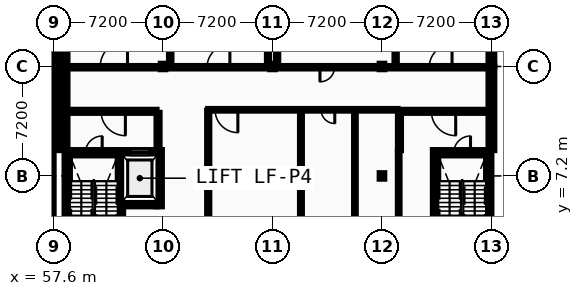
"""IFC4 building model, lengths in metres.
Left out: names, types, materials, properties, quantities, classifications, styles, units other than length and angle.
Written with IfcOpenShell. Run it as: python <this file> out.ifc"""

import sys

from ifc_helpers import new_model, si_unit, direction, frame, frame_2d, origin, origin_2d, place, context, subcontext, project, spatial, rectangle, i_section, extrude, element, fill, save


model = new_model("IFC4")
c1 = context("Model", 3, precision=1e-05, world=origin(), true_north=direction((0.0, 1.0)))
c2 = subcontext(c1, "Body", "Model", "MODEL_VIEW")
j1 = project(units=[si_unit("LENGTHUNIT", "METRE"), si_unit("PLANEANGLEUNIT", "RADIAN")], contexts=[c1])
p1 = place(None, origin())
s1 = spatial("IfcSite", under=j1, at=p1, CompositionType="ELEMENT")
p2 = place(p1, origin())
s2 = spatial("IfcBuilding", under=s1, at=p2, CompositionType="ELEMENT")
p3 = place(p2, frame((0.0, 0.0, 9.6)))
s3 = spatial("IfcBuildingStorey", under=s2, at=p3, CompositionType="ELEMENT", Elevation=9.6)
for number, where, z_axis, x_axis in (
    (1, (57.6, 14.4, 0.0), (0.0, 0.0, 1.0), (1.0, 0.0, 0.0)),
    (2, (58.32, 14.4, 0.0), (0.0, 0.0, 1.0), (1.0, 0.0, 0.0)),
    (3, (64.8, 14.4, 0.0), (0.0, 0.0, 1.0), (1.0, 0.0, 0.0)),
    (4, (72.0, 7.2, 0.0), (0.0, 0.0, 1.0), (1.0, 0.0, 0.0)),
    (5, (72.0, 14.4, 0.0), (0.0, 0.0, 1.0), (1.0, 0.0, 0.0)),
    (6, (79.2, 7.2, 0.0), (0.0, 0.0, 1.0), (1.0, 0.0, 0.0)),
    (7, (79.2, 14.4, 0.0), (0.0, 0.0, 1.0), (1.0, 0.0, 0.0)),
    (8, (86.4, 14.4, 0.0), (0.0, 0.0, 1.0), (1.0, 0.0, 0.0)),
):
    element("IfcColumn", number, at=place(p3, frame(where, z_axis=z_axis, x_axis=x_axis)), inside=s3, PredefinedType="COLUMN", context=c2, shape_type="SweptSolid", body=[
        extrude(i_section(OverallWidth=0.3, OverallDepth=0.36, WebThickness=0.012, FlangeThickness=0.022, FilletRadius=0.027, at=origin_2d()), origin(), (0.0, 0.0, 1.0), 4.4),
    ])
p4 = place(p3, frame((57.6, 8.9, 0.0), z_axis=(0.0, 0.0, 1.0), x_axis=(0.0, 1.0, 0.0)))
e9 = element("IfcWall", 9, at=p4, inside=s3, PredefinedType="STANDARD", context=c2, shape_type="SweptSolid", body=[
    extrude(rectangle(XDim=5.5, YDim=0.38, at=frame_2d((2.75, 0.0))), origin(), (0.0, 0.0, 1.0), 4.2),
])
p5 = place(p3, frame((57.6, 14.4, 0.0), z_axis=(0.0, 0.0, 1.0), x_axis=(0.0, 1.0, 0.0)))
e10 = element("IfcWall", 10, at=p5, inside=s3, PredefinedType="STANDARD", context=c2, shape_type="SweptSolid", body=[
    extrude(rectangle(XDim=7.2, YDim=0.38, at=frame_2d((3.6, 0.0))), origin(), (0.0, 0.0, 1.0), 3.895),
])
p6 = place(p5, frame((1.594, 0.0, 0.95)))
e11 = element("IfcOpeningElement", 11, at=p6, cuts=e10, PredefinedType="OPENING", context=c2, shape_type="SweptSolid", body=[
    extrude(rectangle(XDim=1.132, YDim=1.368, at=frame_2d((0.566, 0.684))), frame((0.0, 0.2, 0.0), z_axis=(0.0, -1.0, 0.0), x_axis=(1.0, 0.0, 0.0)), (0.0, 0.0, 1.0), 0.4),
])
p7 = place(p5, frame((4.474, 0.0, 0.95)))
e12 = element("IfcOpeningElement", 12, at=p7, cuts=e10, PredefinedType="OPENING", context=c2, shape_type="SweptSolid", body=[
    extrude(rectangle(XDim=1.132, YDim=1.368, at=frame_2d((0.566, 0.684))), frame((0.0, 0.2, 0.0), z_axis=(0.0, -1.0, 0.0), x_axis=(1.0, 0.0, 0.0)), (0.0, 0.0, 1.0), 0.4),
])
p8 = place(p3, frame((58.32, 14.4, 0.0), z_axis=(0.0, 0.0, 1.0), x_axis=(0.0, -1.0, 0.0)))
e13 = element("IfcWall", 13, at=p8, inside=s3, PredefinedType="STANDARD", context=c2, shape_type="SweptSolid", body=[
    extrude(rectangle(XDim=5.5, YDim=0.38, at=frame_2d((2.75, 0.0))), origin(), (0.0, 0.0, 1.0), 4.2),
])
p9 = place(p3, frame((58.32, 21.6, 0.0), z_axis=(0.0, 0.0, 1.0), x_axis=(0.0, -1.0, 0.0)))
e14 = element("IfcWall", 14, at=p9, inside=s3, PredefinedType="STANDARD", context=c2, shape_type="SweptSolid", body=[
    extrude(rectangle(XDim=7.2, YDim=0.38, at=frame_2d((3.6, 0.0))), origin(), (0.0, 0.0, 1.0), 3.895),
])
p10 = place(p9, frame((1.713, 0.0, 0.95)))
e15 = element("IfcOpeningElement", 15, at=p10, cuts=e14, PredefinedType="OPENING", context=c2, shape_type="SweptSolid", body=[
    extrude(rectangle(XDim=0.894, YDim=1.332, at=frame_2d((0.447, 0.666))), frame((0.0, 0.2, 0.0), z_axis=(0.0, -1.0, 0.0), x_axis=(1.0, 0.0, 0.0)), (0.0, 0.0, 1.0), 0.4),
])
p11 = place(p9, frame((4.593, 0.0, 0.95)))
e16 = element("IfcOpeningElement", 16, at=p11, cuts=e14, PredefinedType="OPENING", context=c2, shape_type="SweptSolid", body=[
    extrude(rectangle(XDim=0.894, YDim=1.332, at=frame_2d((0.447, 0.666))), frame((0.0, 0.2, 0.0), z_axis=(0.0, -1.0, 0.0), x_axis=(1.0, 0.0, 0.0)), (0.0, 0.0, 1.0), 0.4),
])
p12 = place(p3, frame((86.4, 8.9, 0.0), z_axis=(0.0, 0.0, 1.0), x_axis=(0.0, 1.0, 0.0)))
e17 = element("IfcWall", 17, at=p12, inside=s3, PredefinedType="STANDARD", context=c2, shape_type="SweptSolid", body=[
    extrude(rectangle(XDim=5.5, YDim=0.38, at=frame_2d((2.75, 0.0))), origin(), (0.0, 0.0, 1.0), 4.2),
])
p13 = place(p3, frame((86.4, 14.4, 0.0), z_axis=(0.0, 0.0, 1.0), x_axis=(0.0, 1.0, 0.0)))
e18 = element("IfcWall", 18, at=p13, inside=s3, PredefinedType="STANDARD", context=c2, shape_type="SweptSolid", body=[
    extrude(rectangle(XDim=7.2, YDim=0.38, at=frame_2d((3.6, 0.0))), origin(), (0.0, 0.0, 1.0), 3.885),
])
p14 = place(p13, frame((1.662, 0.0, 0.95)))
e19 = element("IfcOpeningElement", 19, at=p14, cuts=e18, PredefinedType="OPENING", context=c2, shape_type="SweptSolid", body=[
    extrude(rectangle(XDim=0.996, YDim=1.332, at=frame_2d((0.498, 0.666))), frame((0.0, 0.2, 0.0), z_axis=(0.0, -1.0, 0.0), x_axis=(1.0, 0.0, 0.0)), (0.0, 0.0, 1.0), 0.4),
])
p15 = place(p13, frame((4.542, 0.0, 0.95)))
e20 = element("IfcOpeningElement", 20, at=p15, cuts=e18, PredefinedType="OPENING", context=c2, shape_type="SweptSolid", body=[
    extrude(rectangle(XDim=0.996, YDim=1.332, at=frame_2d((0.498, 0.666))), frame((0.0, 0.2, 0.0), z_axis=(0.0, -1.0, 0.0), x_axis=(1.0, 0.0, 0.0)), (0.0, 0.0, 1.0), 0.4),
])
p16 = place(p3, frame((57.425, 0.4, 0.0), z_axis=(0.0, 0.0, 1.0), x_axis=(0.0, 1.0, 0.0)))
e21 = element("IfcWall", 21, at=p16, inside=s3, PredefinedType="SHEAR", context=c2, shape_type="SweptSolid", body=[
    extrude(rectangle(XDim=8.5, YDim=0.35, at=frame_2d((4.25, 0.0))), origin(), (0.0, 0.0, 1.0), 4.2),
])
p17 = place(p3, frame((58.67, 8.725, 0.0), z_axis=(0.0, 0.0, 1.0), x_axis=(1.0, 0.0, 0.0)))
e22 = element("IfcWall", 22, at=p17, inside=s3, PredefinedType="SHEAR", context=c2, shape_type="SweptSolid", body=[
    extrude(rectangle(XDim=3.15, YDim=0.35, at=frame_2d((1.575, 0.0))), origin(), (0.0, 0.0, 1.0), 4.2),
])
p18 = place(p17, frame((1.025, 0.0, 0.0)))
e23 = element("IfcOpeningElement", 23, at=p18, cuts=e22, PredefinedType="OPENING", context=c2, shape_type="SweptSolid", body=[
    extrude(rectangle(XDim=1.1, YDim=2.15, at=frame_2d((0.55, 1.075))), frame((0.0, 0.185, 0.0), z_axis=(0.0, -1.0, 0.0), x_axis=(1.0, 0.0, 0.0)), (0.0, 0.0, 1.0), 0.37),
])
for number, where, z_axis, x_axis in (
    (24, (58.495, 0.4, 0.0), (0.0, 0.0, 1.0), (0.0, 1.0, 0.0)),
    (25, (61.995, 0.4, 0.0), (0.0, 0.0, 1.0), (0.0, 1.0, 0.0)),
):
    element("IfcWall", number, at=place(p3, frame(where, z_axis=z_axis, x_axis=x_axis)), inside=s3, PredefinedType="SHEAR", context=c2, shape_type="SweptSolid", body=[
        extrude(rectangle(XDim=8.5, YDim=0.35, at=frame_2d((4.25, 0.0))), origin(), (0.0, 0.0, 1.0), 4.2),
    ])
p19 = place(p3, frame((62.17, 5.375, 0.0), z_axis=(0.0, 0.0, 1.0), x_axis=(1.0, 0.0, 0.0)))
e26 = element("IfcWall", 26, at=p19, inside=s3, PredefinedType="SHEAR", context=c2, shape_type="SweptSolid", body=[
    extrude(rectangle(XDim=2.2, YDim=0.35, at=frame_2d((1.1, 0.0))), origin(), (0.0, 0.0, 1.0), 4.2),
])
p20 = place(p3, frame((62.17, 8.725, 0.0), z_axis=(0.0, 0.0, 1.0), x_axis=(1.0, 0.0, 0.0)))
e27 = element("IfcWall", 27, at=p20, inside=s3, PredefinedType="SHEAR", context=c2, shape_type="SweptSolid", body=[
    extrude(rectangle(XDim=2.2, YDim=0.35, at=frame_2d((1.1, 0.0))), origin(), (0.0, 0.0, 1.0), 4.2),
])
p21 = place(p20, frame((0.5, 0.0, 0.0)))
e28 = element("IfcOpeningElement", 28, at=p21, cuts=e27, PredefinedType="OPENING", context=c2, shape_type="SweptSolid", body=[
    extrude(rectangle(XDim=1.2, YDim=2.2, at=frame_2d((0.6, 1.1))), frame((0.0, 0.185, 0.0), z_axis=(0.0, -1.0, 0.0), x_axis=(1.0, 0.0, 0.0)), (0.0, 0.0, 1.0), 0.37),
])
p22 = place(p3, frame((64.545, 5.2, 0.0), z_axis=(0.0, 0.0, 1.0), x_axis=(0.0, 1.0, 0.0)))
e29 = element("IfcWall", 29, at=p22, inside=s3, PredefinedType="SHEAR", context=c2, shape_type="SweptSolid", body=[
    extrude(rectangle(XDim=3.7, YDim=0.35, at=frame_2d((1.85, 0.0))), origin(), (0.0, 0.0, 1.0), 4.2),
])
p23 = place(p3, frame((58.67, 11.45, 0.0), z_axis=(0.0, 0.0, 1.0), x_axis=(1.0, 0.0, 0.0)))
e30 = element("IfcWall", 30, at=p23, inside=s3, PredefinedType="PARTITIONING", context=c2, shape_type="SweptSolid", body=[
    extrude(rectangle(XDim=5.7, YDim=0.2, at=frame_2d((2.85, 0.0))), origin(), (0.0, 0.0, 1.0), 4.2),
])
p24 = place(p23, frame((2.05, 0.0, 0.0)))
e31 = element("IfcOpeningElement", 31, at=p24, cuts=e30, PredefinedType="OPENING", context=c2, shape_type="SweptSolid", body=[
    extrude(rectangle(XDim=1.6, YDim=2.2, at=frame_2d((0.8, 1.1))), frame((0.0, 0.11, 0.0), z_axis=(0.0, -1.0, 0.0), x_axis=(1.0, 0.0, 0.0)), (0.0, 0.0, 1.0), 0.22),
])
p25 = place(p3, frame((64.47, 8.9, 0.0), z_axis=(0.0, 0.0, 1.0), x_axis=(0.0, 1.0, 0.0)))
e32 = element("IfcWall", 32, at=p25, inside=s3, PredefinedType="PARTITIONING", context=c2, shape_type="SweptSolid", body=[
    extrude(rectangle(XDim=2.45, YDim=0.2, at=frame_2d((1.225, 0.0))), origin(), (0.0, 0.0, 1.0), 4.2),
])
p26 = place(p3, frame((82.9, 8.725, 0.0), z_axis=(0.0, 0.0, 1.0), x_axis=(1.0, 0.0, 0.0)))
e33 = element("IfcWall", 33, at=p26, inside=s3, PredefinedType="SHEAR", context=c2, shape_type="SweptSolid", body=[
    extrude(rectangle(XDim=3.15, YDim=0.35, at=frame_2d((1.575, 0.0))), origin(), (0.0, 0.0, 1.0), 4.2),
])
p27 = place(p26, frame((1.025, 0.0, 0.0)))
e34 = element("IfcOpeningElement", 34, at=p27, cuts=e33, PredefinedType="OPENING", context=c2, shape_type="SweptSolid", body=[
    extrude(rectangle(XDim=1.1, YDim=2.15, at=frame_2d((0.55, 1.075))), frame((0.0, 0.185, 0.0), z_axis=(0.0, -1.0, 0.0), x_axis=(1.0, 0.0, 0.0)), (0.0, 0.0, 1.0), 0.37),
])
for number, where, z_axis, x_axis in (
    (35, (82.725, 0.19, 0.0), (0.0, 0.0, 1.0), (0.0, 1.0, 0.0)),
    (36, (86.225, 0.19, 0.0), (0.0, 0.0, 1.0), (0.0, 1.0, 0.0)),
):
    element("IfcWall", number, at=place(p3, frame(where, z_axis=z_axis, x_axis=x_axis)), inside=s3, PredefinedType="SHEAR", context=c2, shape_type="SweptSolid", body=[
        extrude(rectangle(XDim=8.71, YDim=0.35, at=frame_2d((4.355, 0.0))), origin(), (0.0, 0.0, 1.0), 4.2),
    ])
p28 = place(p3, frame((80.45, 11.45, 0.0), z_axis=(0.0, 0.0, 1.0), x_axis=(1.0, 0.0, 0.0)))
e37 = element("IfcWall", 37, at=p28, inside=s3, PredefinedType="PARTITIONING", context=c2, shape_type="SweptSolid", body=[
    extrude(rectangle(XDim=5.6, YDim=0.2, at=frame_2d((2.8, 0.0))), origin(), (0.0, 0.0, 1.0), 4.2),
])
p29 = place(p28, frame((2.0, 0.0, 0.0)))
e38 = element("IfcOpeningElement", 38, at=p29, cuts=e37, PredefinedType="OPENING", context=c2, shape_type="SweptSolid", body=[
    extrude(rectangle(XDim=1.6, YDim=2.2, at=frame_2d((0.8, 1.1))), frame((0.0, 0.11, 0.0), z_axis=(0.0, -1.0, 0.0), x_axis=(1.0, 0.0, 0.0)), (0.0, 0.0, 1.0), 0.22),
])
p30 = place(p3, frame((80.35, 8.9, 0.0), z_axis=(0.0, 0.0, 1.0), x_axis=(0.0, 1.0, 0.0)))
e39 = element("IfcWall", 39, at=p30, inside=s3, PredefinedType="PARTITIONING", context=c2, shape_type="SweptSolid", body=[
    extrude(rectangle(XDim=2.45, YDim=0.2, at=frame_2d((1.225, 0.0))), origin(), (0.0, 0.0, 1.0), 4.2),
])
p31 = place(p3, frame((67.77, 11.55, 0.0), z_axis=(0.0, 0.0, 1.0), x_axis=(1.0, 0.0, 0.0)))
e40 = element("IfcWall", 40, at=p31, inside=s3, PredefinedType="PARTITIONING", context=c2, shape_type="SweptSolid", body=[
    extrude(rectangle(XDim=12.46, YDim=0.11, at=frame_2d((6.23, 0.0))), origin(), (0.0, 0.0, 1.0), 4.2),
])
p32 = place(p31, frame((10.1, 0.0, 0.0)))
e41 = element("IfcOpeningElement", 41, at=p32, cuts=e40, PredefinedType="OPENING", context=c2, shape_type="SweptSolid", body=[
    extrude(rectangle(XDim=1.0, YDim=2.1, at=frame_2d((0.5, 1.05))), frame((0.0, 0.065, 0.0), z_axis=(0.0, -1.0, 0.0), x_axis=(1.0, 0.0, 0.0)), (0.0, 0.0, 1.0), 0.13),
])
p33 = place(p31, frame((7.425, 0.0, 0.0)))
e42 = element("IfcOpeningElement", 42, at=p33, cuts=e40, PredefinedType="OPENING", context=c2, shape_type="SweptSolid", body=[
    extrude(rectangle(XDim=0.9, YDim=2.1, at=frame_2d((0.45, 1.05))), frame((0.0, 0.065, 0.0), z_axis=(0.0, -1.0, 0.0), x_axis=(1.0, 0.0, 0.0)), (0.0, 0.0, 1.0), 0.13),
])
p34 = place(p31, frame((0.45, 0.0, 0.0)))
e43 = element("IfcOpeningElement", 43, at=p34, cuts=e40, PredefinedType="OPENING", context=c2, shape_type="SweptSolid", body=[
    extrude(rectangle(XDim=1.5, YDim=2.2, at=frame_2d((0.75, 1.1))), frame((0.0, 0.065, 0.0), z_axis=(0.0, -1.0, 0.0), x_axis=(1.0, 0.0, 0.0)), (0.0, 0.0, 1.0), 0.13),
])
p35 = place(p3, frame((58.7, 14.35, 0.0), z_axis=(0.0, 0.0, 1.0), x_axis=(1.0, 0.0, 0.0)))
e44 = element("IfcWall", 44, at=p35, inside=s3, PredefinedType="PARTITIONING", context=c2, shape_type="SweptSolid", body=[
    extrude(rectangle(XDim=5.72, YDim=0.16, at=frame_2d((2.86, 0.0))), origin(), (0.0, 0.0, 1.0), 3.895),
])
p36 = place(p35, frame((1.96, 0.0, 0.0)))
e45 = element("IfcOpeningElement", 45, at=p36, cuts=e44, PredefinedType="OPENING", context=c2, shape_type="SweptSolid", body=[
    extrude(rectangle(XDim=1.8, YDim=2.3, at=frame_2d((0.9, 1.15))), frame((0.0, 0.09, 0.0), z_axis=(0.0, -1.0, 0.0), x_axis=(1.0, 0.0, 0.0)), (0.0, 0.0, 1.0), 0.18),
])
p37 = place(p3, frame((65.18, 14.35, 0.0), z_axis=(0.0, 0.0, 1.0), x_axis=(1.0, 0.0, 0.0)))
e46 = element("IfcWall", 46, at=p37, inside=s3, PredefinedType="PARTITIONING", context=c2, shape_type="SweptSolid", body=[
    extrude(rectangle(XDim=6.44, YDim=0.16, at=frame_2d((3.22, 0.0))), origin(), (0.0, 0.0, 1.0), 3.895),
])
p38 = place(p37, frame((2.515, 0.0, 0.0)))
e47 = element("IfcOpeningElement", 47, at=p38, cuts=e46, PredefinedType="OPENING", context=c2, shape_type="SweptSolid", body=[
    extrude(rectangle(XDim=1.5, YDim=2.2, at=frame_2d((0.75, 1.1))), frame((0.0, 0.09, 0.0), z_axis=(0.0, -1.0, 0.0), x_axis=(1.0, 0.0, 0.0)), (0.0, 0.0, 1.0), 0.18),
])
p39 = place(p3, frame((72.38, 14.35, 0.0), z_axis=(0.0, 0.0, 1.0), x_axis=(1.0, 0.0, 0.0)))
e48 = element("IfcWall", 48, at=p39, inside=s3, PredefinedType="PARTITIONING", context=c2, shape_type="SweptSolid", body=[
    extrude(rectangle(XDim=6.44, YDim=0.16, at=frame_2d((3.22, 0.0))), origin(), (0.0, 0.0, 1.0), 3.895),
])
p40 = place(p39, frame((2.741, 0.0, 0.0)))
e49 = element("IfcOpeningElement", 49, at=p40, cuts=e48, PredefinedType="OPENING", context=c2, shape_type="SweptSolid", body=[
    extrude(rectangle(XDim=0.958, YDim=2.152, at=frame_2d((0.479, 1.076))), frame((0.0, 0.09, 0.0), z_axis=(0.0, -1.0, 0.0), x_axis=(1.0, 0.0, 0.0)), (0.0, 0.0, 1.0), 0.18),
])
p41 = place(p3, frame((79.58, 14.35, 0.0), z_axis=(0.0, 0.0, 1.0), x_axis=(1.0, 0.0, 0.0)))
e50 = element("IfcWall", 50, at=p41, inside=s3, PredefinedType="PARTITIONING", context=c2, shape_type="SweptSolid", body=[
    extrude(rectangle(XDim=6.44, YDim=0.16, at=frame_2d((3.22, 0.0))), origin(), (0.0, 0.0, 1.0), 3.895),
])
p42 = place(p41, frame((2.73, 0.0, 0.0)))
e51 = element("IfcOpeningElement", 51, at=p42, cuts=e50, PredefinedType="OPENING", context=c2, shape_type="SweptSolid", body=[
    extrude(rectangle(XDim=1.5, YDim=2.2, at=frame_2d((0.75, 1.1))), frame((0.0, 0.09, 0.0), z_axis=(0.0, -1.0, 0.0), x_axis=(1.0, 0.0, 0.0)), (0.0, 0.0, 1.0), 0.18),
])
p43 = place(p3, frame((65.27, 14.43, 0.0), z_axis=(0.0, 0.0, 1.0), x_axis=(0.0, 1.0, 0.0)))
e52 = element("IfcWall", 52, at=p43, inside=s3, PredefinedType="PARTITIONING", context=c2, shape_type="SweptSolid", body=[
    extrude(rectangle(XDim=14.09, YDim=0.16, at=frame_2d((7.045, 0.0))), origin(), (0.0, 0.0, 1.0), 4.2),
])
p44 = place(p3, frame((67.77, 3.36, 0.0), z_axis=(0.0, 0.0, 1.0), x_axis=(0.0, 1.0, 0.0)))
e53 = element("IfcWall", 53, at=p44, inside=s3, PredefinedType="PARTITIONING", context=c2, shape_type="SweptSolid", body=[
    extrude(rectangle(XDim=8.135, YDim=0.142, at=frame_2d((4.067, 0.0))), origin(), (0.0, 0.0, 1.0), 4.2),
])
p45 = place(p3, frame((71.7, 14.78, 0.0), z_axis=(0.0, 0.0, 1.0), x_axis=(0.0, 1.0, 0.0)))
e54 = element("IfcWall", 54, at=p45, inside=s3, PredefinedType="PARTITIONING", context=c2, shape_type="SweptSolid", body=[
    extrude(rectangle(XDim=6.44, YDim=0.135, at=frame_2d((3.22, 0.0))), origin(), (0.0, 0.0, 1.0), 4.2),
])
p46 = place(p3, frame((72.3, 14.78, 0.0), z_axis=(0.0, 0.0, 1.0), x_axis=(0.0, 1.0, 0.0)))
e55 = element("IfcWall", 55, at=p46, inside=s3, PredefinedType="PARTITIONING", context=c2, shape_type="SweptSolid", body=[
    extrude(rectangle(XDim=6.44, YDim=0.15, at=frame_2d((3.22, 0.0))), origin(), (0.0, 0.0, 1.0), 3.895),
])
p47 = place(p3, frame((73.87, 0.2, 0.0), z_axis=(0.0, 0.0, 1.0), x_axis=(0.0, 1.0, 0.0)))
e56 = element("IfcWall", 56, at=p47, inside=s3, PredefinedType="PARTITIONING", context=c2, shape_type="SweptSolid", body=[
    extrude(rectangle(XDim=11.295, YDim=0.125, at=frame_2d((5.647, 0.0))), origin(), (0.0, 0.0, 1.0), 4.2),
])
p48 = place(p3, frame((77.42, 0.2, 0.0), z_axis=(0.0, 0.0, 1.0), x_axis=(0.0, 1.0, 0.0)))
e57 = element("IfcWall", 57, at=p48, inside=s3, PredefinedType="PARTITIONING", context=c2, shape_type="SweptSolid", body=[
    extrude(rectangle(XDim=11.295, YDim=0.11, at=frame_2d((5.647, 0.0))), origin(), (0.0, 0.0, 1.0), 4.2),
])
p49 = place(p3, frame((80.1, 14.43, 0.0), z_axis=(0.0, 0.0, 1.0), x_axis=(0.0, 1.0, 0.0)))
e58 = element("IfcWall", 58, at=p49, inside=s3, PredefinedType="PARTITIONING", context=c2, shape_type="SweptSolid", body=[
    extrude(rectangle(XDim=14.17, YDim=0.15, at=frame_2d((7.085, 0.0))), origin(), (0.0, 0.0, 1.0), 4.2),
])
p50 = place(p3, frame((80.3, 0.2, 0.0), z_axis=(0.0, 0.0, 1.0), x_axis=(0.0, 1.0, 0.0)))
e59 = element("IfcWall", 59, at=p50, inside=s3, PredefinedType="PARTITIONING", context=c2, shape_type="SweptSolid", body=[
    extrude(rectangle(XDim=8.6, YDim=0.11, at=frame_2d((4.3, 0.0))), origin(), (0.0, 0.0, 1.0), 4.2),
])
p51 = place(p18, frame((1.1, 0.0, 0.0), z_axis=(0.0, 0.0, 1.0), x_axis=(-1.0, 0.0, 0.0)))
e60 = element("IfcDoor", 60, at=p51, inside=s3, OperationType="SINGLE_SWING_RIGHT", PredefinedType="DOOR", context=c2, shape_type="SweptSolid", body=[
    extrude(rectangle(XDim=1.1, YDim=2.15, at=frame_2d((0.55, 1.075))), frame((0.0, 0.025, 0.0), z_axis=(0.0, -1.0, 0.0), x_axis=(1.0, 0.0, 0.0)), (0.0, 0.0, 1.0), 0.05),
])
fill(e23, e60)
p52 = place(p21, origin())
e61 = element("IfcDoor", 61, at=p52, inside=s3, OperationType="SLIDING_TO_RIGHT", PredefinedType="DOOR", context=c2, shape_type="SweptSolid", body=[
    extrude(rectangle(XDim=1.2, YDim=2.2, at=frame_2d((0.6, 1.1))), frame((0.0, 0.025, 0.0), z_axis=(0.0, -1.0, 0.0), x_axis=(1.0, 0.0, 0.0)), (0.0, 0.0, 1.0), 0.05),
])
fill(e28, e61)
p53 = place(p24, origin())
e62 = element("IfcDoor", 62, at=p53, inside=s3, OperationType="DOUBLE_DOOR_SINGLE_SWING", PredefinedType="DOOR", context=c2, shape_type="SweptSolid", body=[
    extrude(rectangle(XDim=1.6, YDim=2.2, at=frame_2d((0.8, 1.1))), frame((0.0, 0.025, 0.0), z_axis=(0.0, -1.0, 0.0), x_axis=(1.0, 0.0, 0.0)), (0.0, 0.0, 1.0), 0.05),
])
fill(e31, e62)
p54 = place(p27, frame((1.1, 0.0, 0.0), z_axis=(0.0, 0.0, 1.0), x_axis=(-1.0, 0.0, 0.0)))
e63 = element("IfcDoor", 63, at=p54, inside=s3, OperationType="SINGLE_SWING_RIGHT", PredefinedType="DOOR", context=c2, shape_type="SweptSolid", body=[
    extrude(rectangle(XDim=1.1, YDim=2.15, at=frame_2d((0.55, 1.075))), frame((0.0, 0.025, 0.0), z_axis=(0.0, -1.0, 0.0), x_axis=(1.0, 0.0, 0.0)), (0.0, 0.0, 1.0), 0.05),
])
fill(e34, e63)
p55 = place(p29, origin())
e64 = element("IfcDoor", 64, at=p55, inside=s3, OperationType="DOUBLE_DOOR_SINGLE_SWING", PredefinedType="DOOR", context=c2, shape_type="SweptSolid", body=[
    extrude(rectangle(XDim=1.6, YDim=2.2, at=frame_2d((0.8, 1.1))), frame((0.0, 0.025, 0.0), z_axis=(0.0, -1.0, 0.0), x_axis=(1.0, 0.0, 0.0)), (0.0, 0.0, 1.0), 0.05),
])
fill(e38, e64)
p56 = place(p32, origin())
e65 = element("IfcDoor", 65, at=p56, inside=s3, OperationType="SLIDING_TO_LEFT", PredefinedType="DOOR", context=c2, shape_type="SweptSolid", body=[
    extrude(rectangle(XDim=1.0, YDim=2.1, at=frame_2d((0.5, 1.05))), frame((0.0, 0.025, 0.0), z_axis=(0.0, -1.0, 0.0), x_axis=(1.0, 0.0, 0.0)), (0.0, 0.0, 1.0), 0.05),
])
fill(e41, e65)
p57 = place(p33, origin())
e66 = element("IfcDoor", 66, at=p57, inside=s3, OperationType="SINGLE_SWING_RIGHT", PredefinedType="DOOR", context=c2, shape_type="SweptSolid", body=[
    extrude(rectangle(XDim=0.9, YDim=2.1, at=frame_2d((0.45, 1.05))), frame((0.0, 0.025, 0.0), z_axis=(0.0, -1.0, 0.0), x_axis=(1.0, 0.0, 0.0)), (0.0, 0.0, 1.0), 0.05),
])
fill(e42, e66)
p58 = place(p34, origin())
e67 = element("IfcDoor", 67, at=p58, inside=s3, OperationType="DOUBLE_DOOR_SINGLE_SWING", PredefinedType="DOOR", context=c2, shape_type="SweptSolid", body=[
    extrude(rectangle(XDim=1.5, YDim=2.2, at=frame_2d((0.75, 1.1))), frame((0.0, 0.025, 0.0), z_axis=(0.0, -1.0, 0.0), x_axis=(1.0, 0.0, 0.0)), (0.0, 0.0, 1.0), 0.05),
])
fill(e43, e67)
p59 = place(p42, frame((1.5, 0.0, 0.0), z_axis=(0.0, 0.0, 1.0), x_axis=(-1.0, 0.0, 0.0)))
e68 = element("IfcDoor", 68, at=p59, inside=s3, OperationType="DOUBLE_DOOR_SINGLE_SWING", PredefinedType="DOOR", context=c2, shape_type="SweptSolid", body=[
    extrude(rectangle(XDim=1.5, YDim=2.2, at=frame_2d((0.75, 1.1))), frame((0.0, 0.025, 0.0), z_axis=(0.0, -1.0, 0.0), x_axis=(1.0, 0.0, 0.0)), (0.0, 0.0, 1.0), 0.05),
])
fill(e51, e68)
p60 = place(p38, frame((1.5, 0.0, 0.0), z_axis=(0.0, 0.0, 1.0), x_axis=(-1.0, 0.0, 0.0)))
e69 = element("IfcDoor", 69, at=p60, inside=s3, OperationType="DOUBLE_DOOR_SINGLE_SWING", PredefinedType="DOOR", context=c2, shape_type="SweptSolid", body=[
    extrude(rectangle(XDim=1.5, YDim=2.2, at=frame_2d((0.75, 1.1))), frame((0.0, 0.025, 0.0), z_axis=(0.0, -1.0, 0.0), x_axis=(1.0, 0.0, 0.0)), (0.0, 0.0, 1.0), 0.05),
])
fill(e47, e69)
p61 = place(p36, frame((1.8, 0.0, 0.0), z_axis=(0.0, 0.0, 1.0), x_axis=(-1.0, 0.0, 0.0)))
e70 = element("IfcDoor", 70, at=p61, inside=s3, OperationType="DOUBLE_DOOR_SINGLE_SWING", PredefinedType="DOOR", context=c2, shape_type="SweptSolid", body=[
    extrude(rectangle(XDim=1.8, YDim=2.3, at=frame_2d((0.9, 1.15))), frame((0.0, 0.025, 0.0), z_axis=(0.0, -1.0, 0.0), x_axis=(1.0, 0.0, 0.0)), (0.0, 0.0, 1.0), 0.05),
])
fill(e45, e70)
p62 = place(p40, frame((0.958, 0.0, 0.0), z_axis=(0.0, 0.0, 1.0), x_axis=(-1.0, 0.0, 0.0)))
e71 = element("IfcDoor", 71, at=p62, inside=s3, OperationType="SINGLE_SWING_LEFT", PredefinedType="DOOR", context=c2, shape_type="SweptSolid", body=[
    extrude(rectangle(XDim=0.958, YDim=2.152, at=frame_2d((0.479, 1.076))), frame((0.0, 0.025, 0.0), z_axis=(0.0, -1.0, 0.0), x_axis=(1.0, 0.0, 0.0)), (0.0, 0.0, 1.0), 0.05),
])
fill(e49, e71)
save(model, sys.argv[1])
